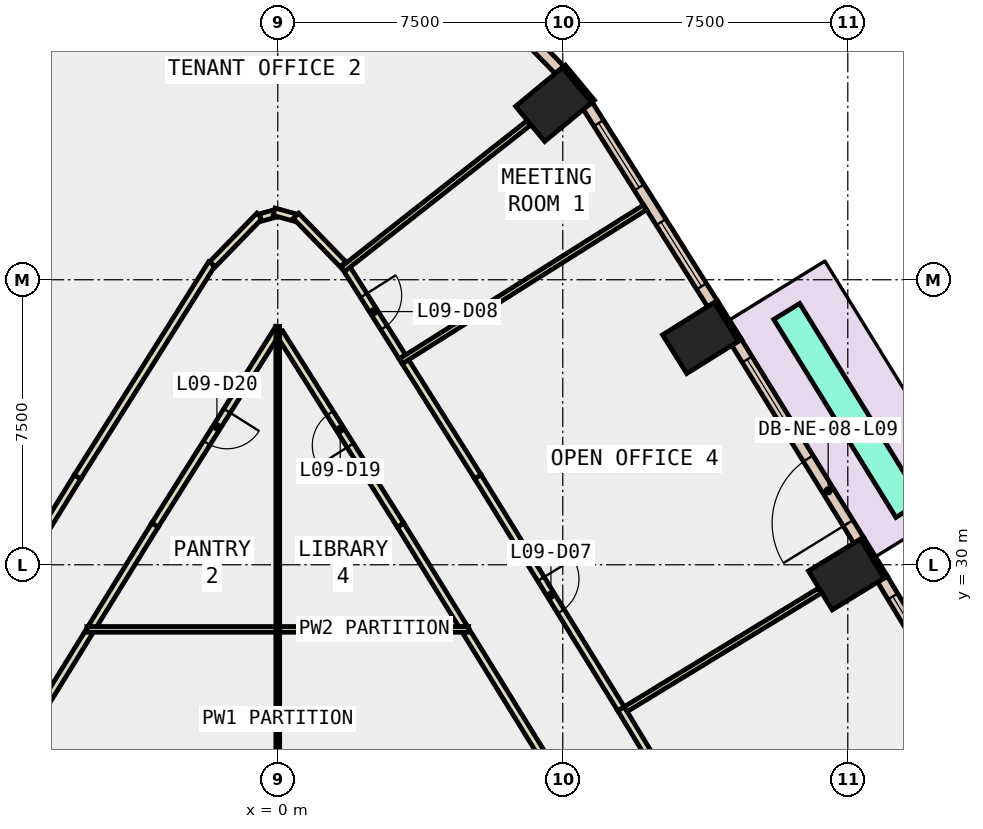
"""IFC4 building model, lengths in metres.
Left out: names, types, materials, properties, quantities, classifications, styles, units other than length and angle.
Written with IfcOpenShell. Run it as: python <this file> out.ifc"""

import sys

from ifc_helpers import new_model, si_unit, direction, frame, frame_2d, origin, origin_2d, place, context, subcontext, project, spatial, rectangle, extrude, element, fill, save


model = new_model("IFC4")
c1 = context("Model", 3, precision=1e-05, world=origin(), true_north=direction((0.0, 1.0)))
c2 = subcontext(c1, "Body", "Model", "MODEL_VIEW")
j1 = project(units=[si_unit("LENGTHUNIT", "METRE"), si_unit("PLANEANGLEUNIT", "RADIAN")], contexts=[c1])
p1 = place(None, origin())
s1 = spatial("IfcSite", under=j1, at=p1, CompositionType="ELEMENT")
p2 = place(p1, origin())
s2 = spatial("IfcBuilding", under=s1, at=p2, CompositionType="ELEMENT")
p3 = place(p2, frame((0.0, 0.0, 47.6)))
s3 = spatial("IfcBuildingStorey", under=s2, at=p3, CompositionType="ELEMENT", Elevation=47.6)
for number, where, z_axis, x_axis in (
    (1, (14.961, 29.743, -0.4), (0.0, 0.0, 1.0), (-0.522, 0.853, 0.0)),
    (2, (11.123, 35.965, -0.4), (0.0, 0.0, 1.0), (-0.53, 0.848, 0.0)),
    (3, (7.258, 42.111, -0.4), (0.0, 0.0, 1.0), (-0.638, 0.77, 0.0)),
):
    element("IfcColumn", number, at=place(p3, frame(where, z_axis=z_axis, x_axis=x_axis)), inside=s3, PredefinedType="COLUMN", context=c2, shape_type="SweptSolid", body=[
        extrude(rectangle(XDim=1.2, YDim=1.6, at=origin_2d()), origin(), (0.0, 0.0, 1.0), 4.2),
    ])
p4 = place(p3, frame((15.999, 29.674, 0.0), z_axis=(0.0, 0.0, 1.0), x_axis=(-0.521598117945, 0.853191305251, 0.0)))
e4 = element("IfcWall", 4, at=p4, inside=s3, PredefinedType="STANDARD", context=c2, shape_type="SweptSolid", body=[
    extrude(rectangle(XDim=1.2, YDim=0.1, at=frame_2d((0.6, 0.0))), origin(), (0.0, 0.0, 1.0), 3.8),
])
p5 = place(p3, frame((12.162, 35.907, 0.0), z_axis=(0.0, 0.0, 1.0), x_axis=(-0.530328162925, 0.847792450785, 0.0)))
e5 = element("IfcWall", 5, at=p5, inside=s3, PredefinedType="STANDARD", context=c2, shape_type="SweptSolid", body=[
    extrude(rectangle(XDim=1.2, YDim=0.1, at=frame_2d((0.6, 0.0))), origin(), (0.0, 0.0, 1.0), 3.8),
])
p6 = place(p3, frame((8.295, 42.191, 0.0), z_axis=(0.0, 0.0, 1.0), x_axis=(-0.637638520791, 0.770335716947, 0.0)))
e6 = element("IfcWall", 6, at=p6, inside=s3, PredefinedType="STANDARD", context=c2, shape_type="SweptSolid", body=[
    extrude(rectangle(XDim=1.199, YDim=0.1, at=frame_2d((0.6, 0.0))), origin(), (0.0, 0.0, 1.0), 3.8),
])
p7 = place(p3, frame((19.074, 24.38, 0.0), z_axis=(0.0, 0.0, 1.0), x_axis=(-0.516699243123, 0.856166976796, 0.0)))
e7 = element("IfcWall", 7, at=p7, inside=s3, PredefinedType="STANDARD", context=c2, shape_type="SweptSolid", body=[
    extrude(rectangle(XDim=6.122, YDim=0.3, at=frame_2d((3.061, 0.0))), origin(), (0.0, 0.0, 1.0), 3.8),
])
p8 = place(p7, frame((0.53, 0.0, 0.9)))
e8 = element("IfcOpeningElement", 8, at=p8, cuts=e7, PredefinedType="OPENING", context=c2, shape_type="SweptSolid", body=[
    extrude(rectangle(XDim=2.0, YDim=2.6, at=frame_2d((1.0, 1.3))), frame((0.0, 0.16, 0.0), z_axis=(0.0, -1.0, 0.0), x_axis=(1.0, 0.0, 0.0)), (0.0, 0.0, 1.0), 0.32),
])
p9 = place(p7, frame((3.591, 0.0, 0.9)))
e9 = element("IfcOpeningElement", 9, at=p9, cuts=e7, PredefinedType="OPENING", context=c2, shape_type="SweptSolid", body=[
    extrude(rectangle(XDim=2.0, YDim=2.6, at=frame_2d((1.0, 1.3))), frame((0.0, 0.16, 0.0), z_axis=(0.0, -1.0, 0.0), x_axis=(1.0, 0.0, 0.0)), (0.0, 0.0, 1.0), 0.32),
])
p10 = place(p3, frame((15.287, 30.644, 0.0), z_axis=(0.0, 0.0, 1.0), x_axis=(-0.525114088226, 0.851031840971, 0.0)))
e10 = element("IfcWall", 10, at=p10, inside=s3, PredefinedType="STANDARD", context=c2, shape_type="SweptSolid", body=[
    extrude(rectangle(XDim=6.121, YDim=0.3, at=frame_2d((3.061, 0.0))), origin(), (0.0, 0.0, 1.0), 3.8),
])
p11 = place(p10, frame((0.53, 0.0, 0.0)))
e11 = element("IfcOpeningElement", 11, at=p11, cuts=e10, PredefinedType="OPENING", context=c2, shape_type="SweptSolid", body=[
    extrude(rectangle(XDim=2.0, YDim=2.4, at=frame_2d((1.0, 1.2))), frame((0.0, 0.16, 0.0), z_axis=(0.0, -1.0, 0.0), x_axis=(1.0, 0.0, 0.0)), (0.0, 0.0, 1.0), 0.32),
])
p12 = place(p10, frame((3.591, 0.0, 0.9)))
e12 = element("IfcOpeningElement", 12, at=p12, cuts=e10, PredefinedType="OPENING", context=c2, shape_type="SweptSolid", body=[
    extrude(rectangle(XDim=2.0, YDim=2.6, at=frame_2d((1.0, 1.3))), frame((0.0, 0.16, 0.0), z_axis=(0.0, -1.0, 0.0), x_axis=(1.0, 0.0, 0.0)), (0.0, 0.0, 1.0), 0.32),
])
p13 = place(p3, frame((11.439, 36.869, 0.0), z_axis=(0.0, 0.0, 1.0), x_axis=(-0.533075127321, 0.846067910177, 0.0)))
e13 = element("IfcWall", 13, at=p13, inside=s3, PredefinedType="STANDARD", context=c2, shape_type="SweptSolid", body=[
    extrude(rectangle(XDim=6.157, YDim=0.3, at=frame_2d((3.078, 0.0))), origin(), (0.0, 0.0, 1.0), 3.8),
])
p14 = place(p13, frame((0.539, 0.0, 0.9)))
e14 = element("IfcOpeningElement", 14, at=p14, cuts=e13, PredefinedType="OPENING", context=c2, shape_type="SweptSolid", body=[
    extrude(rectangle(XDim=2.0, YDim=2.6, at=frame_2d((1.0, 1.3))), frame((0.0, 0.16, 0.0), z_axis=(0.0, -1.0, 0.0), x_axis=(1.0, 0.0, 0.0)), (0.0, 0.0, 1.0), 0.32),
])
p15 = place(p13, frame((3.618, 0.0, 0.9)))
e15 = element("IfcOpeningElement", 15, at=p15, cuts=e13, PredefinedType="OPENING", context=c2, shape_type="SweptSolid", body=[
    extrude(rectangle(XDim=2.0, YDim=2.6, at=frame_2d((1.0, 1.3))), frame((0.0, 0.16, 0.0), z_axis=(0.0, -1.0, 0.0), x_axis=(1.0, 0.0, 0.0)), (0.0, 0.0, 1.0), 0.32),
])
p16 = place(p3, frame((7.416, 43.02, 0.0), z_axis=(0.0, 0.0, 1.0), x_axis=(-0.696939827977, 0.717129609052, 0.0)))
e16 = element("IfcWall", 16, at=p16, inside=s3, PredefinedType="STANDARD", context=c2, shape_type="SweptSolid", body=[
    extrude(rectangle(XDim=3.422, YDim=0.3, at=frame_2d((1.711, 0.0))), origin(), (0.0, 0.0, 1.0), 3.8),
])
p17 = place(p16, frame((1.011, 0.0, 0.9)))
e17 = element("IfcOpeningElement", 17, at=p17, cuts=e16, PredefinedType="OPENING", context=c2, shape_type="SweptSolid", body=[
    extrude(rectangle(XDim=1.4, YDim=2.6, at=frame_2d((0.7, 1.3))), frame((0.0, 0.16, 0.0), z_axis=(0.0, -1.0, 0.0), x_axis=(1.0, 0.0, 0.0)), (0.0, 0.0, 1.0), 0.32),
])
p18 = place(p3, frame((-5.031, 45.474, 0.0), z_axis=(0.0, 0.0, 1.0), x_axis=(-0.696939827977, -0.717129609052, 0.0)))
e18 = element("IfcWall", 18, at=p18, inside=s3, PredefinedType="STANDARD", context=c2, shape_type="SweptSolid", body=[
    extrude(rectangle(XDim=3.422, YDim=0.3, at=frame_2d((1.711, 0.0))), origin(), (0.0, 0.0, 1.0), 3.8),
])
p19 = place(p18, frame((1.011, 0.0, 0.9)))
e19 = element("IfcOpeningElement", 19, at=p19, cuts=e18, PredefinedType="OPENING", context=c2, shape_type="SweptSolid", body=[
    extrude(rectangle(XDim=1.4, YDim=2.6, at=frame_2d((0.7, 1.3))), frame((0.0, 0.16, 0.0), z_axis=(0.0, -1.0, 0.0), x_axis=(1.0, 0.0, 0.0)), (0.0, 0.0, 1.0), 0.32),
])
p20 = place(p3, frame((16.606, 31.458, 0.0), z_axis=(0.0, 0.0, 1.0), x_axis=(-0.52504092683, 0.85107697957, 0.0)))
e20 = element("IfcWall", 20, at=p20, inside=s3, PredefinedType="STANDARD", context=c2, shape_type="SweptSolid", body=[
    extrude(rectangle(XDim=6.119, YDim=0.8, at=frame_2d((3.06, 0.0))), origin(), (0.0, 0.0, 1.0), 0.8),
])
for number, where, z_axis, x_axis in (
    (21, (7.022, 24.899, 0.0), (0.0, 0.0, 1.0), (-0.525, 0.851, 0.0)),
    (22, (-4.963, 28.236, 0.0), (0.0, 0.0, 1.0), (-0.525, -0.851, 0.0)),
):
    element("IfcWall", number, at=place(p3, frame(where, z_axis=z_axis, x_axis=x_axis)), inside=s3, PredefinedType="PARTITIONING", context=c2, shape_type="SweptSolid", body=[
        extrude(rectangle(XDim=3.921, YDim=0.2, at=frame_2d((1.961, 0.0))), origin(), (0.0, 0.0, 1.0), 3.8),
    ])
p21 = place(p3, frame((4.885, 28.364, 0.0), z_axis=(0.0, 0.0, 1.0), x_axis=(-0.525078663571, 0.851053698107, 0.0)))
e23 = element("IfcWall", 23, at=p21, inside=s3, PredefinedType="PARTITIONING", context=c2, shape_type="SweptSolid", body=[
    extrude(rectangle(XDim=3.15, YDim=0.2, at=frame_2d((1.575, 0.0))), origin(), (0.0, 0.0, 1.0), 3.8),
])
p22 = place(p3, frame((3.231, 31.045, 0.0), z_axis=(0.0, 0.0, 1.0), x_axis=(-0.533294550084, 0.845929620507, 0.0)))
e24 = element("IfcWall", 24, at=p22, inside=s3, PredefinedType="PARTITIONING", context=c2, shape_type="SweptSolid", body=[
    extrude(rectangle(XDim=5.959, YDim=0.2, at=frame_2d((2.979, 0.0))), origin(), (0.0, 0.0, 1.0), 3.8),
])
p23 = place(p22, frame((2.479, 0.0, 0.0)))
e25 = element("IfcOpeningElement", 25, at=p23, cuts=e24, PredefinedType="OPENING", context=c2, shape_type="SweptSolid", body=[
    extrude(rectangle(XDim=1.0, YDim=2.1, at=frame_2d((0.5, 1.05))), frame((0.0, 0.11, 0.0), z_axis=(0.0, -1.0, 0.0), x_axis=(1.0, 0.0, 0.0)), (0.0, 0.0, 1.0), 0.22),
])
p24 = place(p3, frame((0.027, 36.213, 0.0), z_axis=(0.0, 0.0, 1.0), x_axis=(-0.533299680037, -0.845926386438, 0.0)))
e26 = element("IfcWall", 26, at=p24, inside=s3, PredefinedType="PARTITIONING", context=c2, shape_type="SweptSolid", body=[
    extrude(rectangle(XDim=6.109, YDim=0.2, at=frame_2d((3.055, 0.0))), origin(), (0.0, 0.0, 1.0), 3.8),
])
p25 = place(p24, frame((2.554, 0.0, 0.0)))
e27 = element("IfcOpeningElement", 27, at=p25, cuts=e26, PredefinedType="OPENING", context=c2, shape_type="SweptSolid", body=[
    extrude(rectangle(XDim=1.0, YDim=2.1, at=frame_2d((0.5, 1.05))), frame((0.0, 0.11, 0.0), z_axis=(0.0, -1.0, 0.0), x_axis=(1.0, 0.0, 0.0)), (0.0, 0.0, 1.0), 0.22),
])
p26 = place(p3, frame((-3.231, 31.045, 0.0), z_axis=(0.0, 0.0, 1.0), x_axis=(-0.525078663571, -0.851053698107, 0.0)))
e28 = element("IfcWall", 28, at=p26, inside=s3, PredefinedType="PARTITIONING", context=c2, shape_type="SweptSolid", body=[
    extrude(rectangle(XDim=3.15, YDim=0.2, at=frame_2d((1.575, 0.0))), origin(), (0.0, 0.0, 1.0), 3.8),
])
p27 = place(p3, frame((9.032, 26.213, 0.0), z_axis=(0.0, 0.0, 1.0), x_axis=(0.516789314756, -0.856112611841, 0.0)))
e29 = element("IfcWall", 29, at=p27, inside=s3, PredefinedType="PARTITIONING", context=c2, shape_type="SweptSolid", body=[
    extrude(rectangle(XDim=7.32, YDim=0.2, at=frame_2d((3.66, 0.0))), origin(), (0.0, 0.0, 1.0), 3.8),
])
p28 = place(p27, frame((3.16, 0.0, 0.0)))
e30 = element("IfcOpeningElement", 30, at=p28, cuts=e29, PredefinedType="OPENING", context=c2, shape_type="SweptSolid", body=[
    extrude(rectangle(XDim=1.0, YDim=2.1, at=frame_2d((0.5, 1.05))), frame((0.0, 0.11, 0.0), z_axis=(0.0, -1.0, 0.0), x_axis=(1.0, 0.0, 0.0)), (0.0, 0.0, 1.0), 0.22),
])
p29 = place(p3, frame((3.359, 35.341, 0.0), z_axis=(0.0, 0.0, 1.0), x_axis=(0.533386910893, -0.845871386966, 0.0)))
e31 = element("IfcWall", 31, at=p29, inside=s3, PredefinedType="PARTITIONING", context=c2, shape_type="SweptSolid", body=[
    extrude(rectangle(XDim=3.578, YDim=0.2, at=frame_2d((1.789, 0.0))), origin(), (0.0, 0.0, 1.0), 3.8),
])
p30 = place(p3, frame((5.267, 32.315, 0.0), z_axis=(0.0, 0.0, 1.0), x_axis=(0.524988204957, -0.851109502153, 0.0)))
e32 = element("IfcWall", 32, at=p30, inside=s3, PredefinedType="PARTITIONING", context=c2, shape_type="SweptSolid", body=[
    extrude(rectangle(XDim=7.169, YDim=0.2, at=frame_2d((3.585, 0.0))), origin(), (0.0, 0.0, 1.0), 3.8),
])
p31 = place(p30, frame((3.16, 0.0, 0.0)))
e33 = element("IfcOpeningElement", 33, at=p31, cuts=e32, PredefinedType="OPENING", context=c2, shape_type="SweptSolid", body=[
    extrude(rectangle(XDim=1.0, YDim=2.1, at=frame_2d((0.5, 1.05))), frame((0.0, 0.11, 0.0), z_axis=(0.0, -1.0, 0.0), x_axis=(1.0, 0.0, 0.0)), (0.0, 0.0, 1.0), 0.22),
])
p32 = place(p3, frame((1.775, 37.856, 0.0), z_axis=(0.0, 0.0, 1.0), x_axis=(0.533221537001, -0.845975645322, 0.0)))
e34 = element("IfcWall", 34, at=p32, inside=s3, PredefinedType="PARTITIONING", context=c2, shape_type="SweptSolid", body=[
    extrude(rectangle(XDim=2.823, YDim=0.2, at=frame_2d((1.411, 0.0))), origin(), (0.0, 0.0, 1.0), 3.8),
])
p33 = place(p32, frame((0.911, 0.0, 0.0)))
e35 = element("IfcOpeningElement", 35, at=p33, cuts=e34, PredefinedType="OPENING", context=c2, shape_type="SweptSolid", body=[
    extrude(rectangle(XDim=1.0, YDim=2.1, at=frame_2d((0.5, 1.05))), frame((0.0, 0.11, 0.0), z_axis=(0.0, -1.0, 0.0), x_axis=(1.0, 0.0, 0.0)), (0.0, 0.0, 1.0), 0.22),
])
p34 = place(p3, frame((-9.11, 26.085, 0.0), z_axis=(0.0, 0.0, 1.0), x_axis=(0.525007100846, 0.85109784635, 0.0)))
e36 = element("IfcWall", 36, at=p34, inside=s3, PredefinedType="PARTITIONING", context=c2, shape_type="SweptSolid", body=[
    extrude(rectangle(XDim=7.32, YDim=0.2, at=frame_2d((3.66, 0.0))), origin(), (0.0, 0.0, 1.0), 3.8),
])
p35 = place(p34, frame((3.16, 0.0, 0.0)))
e37 = element("IfcOpeningElement", 37, at=p35, cuts=e36, PredefinedType="OPENING", context=c2, shape_type="SweptSolid", body=[
    extrude(rectangle(XDim=1.0, YDim=2.1, at=frame_2d((0.5, 1.05))), frame((0.0, 0.11, 0.0), z_axis=(0.0, -1.0, 0.0), x_axis=(1.0, 0.0, 0.0)), (0.0, 0.0, 1.0), 0.22),
])
p36 = place(p3, frame((-5.267, 32.315, 0.0), z_axis=(0.0, 0.0, 1.0), x_axis=(0.533195424135, 0.845992103794, 0.0)))
e38 = element("IfcWall", 38, at=p36, inside=s3, PredefinedType="PARTITIONING", context=c2, shape_type="SweptSolid", body=[
    extrude(rectangle(XDim=6.624, YDim=0.2, at=frame_2d((3.312, 0.0))), origin(), (0.0, 0.0, 1.0), 3.8),
])
p37 = place(p3, frame((-1.718, 37.906, 0.0), z_axis=(0.0, 0.0, 1.0), x_axis=(0.696949052806, 0.71712064382, 0.0)))
e39 = element("IfcWall", 39, at=p37, inside=s3, PredefinedType="PARTITIONING", context=c2, shape_type="SweptSolid", body=[
    extrude(rectangle(XDim=1.779, YDim=0.2, at=frame_2d((0.89, 0.0))), origin(), (0.0, 0.0, 1.0), 3.8),
])
p38 = place(p3, frame((-0.452, 39.137, 0.0), z_axis=(0.0, 0.0, 1.0), x_axis=(0.963347325023, 0.26825721122, 0.0)))
e40 = element("IfcWall", 40, at=p38, inside=s3, PredefinedType="PARTITIONING", context=c2, shape_type="SweptSolid", body=[
    extrude(rectangle(XDim=0.369, YDim=0.2, at=frame_2d((0.185, 0.0))), origin(), (0.0, 0.0, 1.0), 3.8),
])
p39 = place(p3, frame((-0.096, 39.29, 0.0), z_axis=(0.0, 0.0, 1.0), x_axis=(0.963110974003, -0.269104536854, 0.0)))
e41 = element("IfcWall", 41, at=p39, inside=s3, PredefinedType="PARTITIONING", context=c2, shape_type="SweptSolid", body=[
    extrude(rectangle(XDim=0.569, YDim=0.2, at=frame_2d((0.284, 0.0))), origin(), (0.0, 0.0, 1.0), 3.8),
])
p40 = place(p3, frame((0.478, 39.182, 0.0), z_axis=(0.0, 0.0, 1.0), x_axis=(0.696949052806, -0.71712064382, 0.0)))
e42 = element("IfcWall", 42, at=p40, inside=s3, PredefinedType="PARTITIONING", context=c2, shape_type="SweptSolid", body=[
    extrude(rectangle(XDim=1.779, YDim=0.2, at=frame_2d((0.89, 0.0))), origin(), (0.0, 0.0, 1.0), 3.8),
])
p41 = place(p3, frame((0.0, 23.5, 0.0), z_axis=(0.0, 0.0, 1.0), x_axis=(0.0, 1.0, 0.0)))
e43 = element("IfcWall", 43, at=p41, inside=s3, PredefinedType="PARTITIONING", context=c2, shape_type="SweptSolid", body=[
    extrude(rectangle(XDim=4.875, YDim=0.1, at=frame_2d((2.438, 0.0))), origin(), (0.0, 0.0, 1.0), 3.8),
])
for number, where, z_axis, x_axis in (
    (44, (0.05, 28.3, 0.0), (0.0, 0.0, 1.0), (1.0, 0.0, 0.0)),
    (45, (-5.024, 28.3, 0.0), (0.0, 0.0, 1.0), (1.0, 0.0, 0.0)),
):
    element("IfcWall", number, at=place(p3, frame(where, z_axis=z_axis, x_axis=x_axis)), inside=s3, PredefinedType="PARTITIONING", context=c2, shape_type="SweptSolid", body=[
        extrude(rectangle(XDim=4.974, YDim=0.15, at=frame_2d((2.487, 0.0))), origin(), (0.0, 0.0, 1.0), 3.8),
    ])
p42 = place(p3, frame((0.0, 28.375, 0.0), z_axis=(0.0, 0.0, 1.0), x_axis=(0.0, 1.0, 0.0)))
e46 = element("IfcWall", 46, at=p42, inside=s3, PredefinedType="PARTITIONING", context=c2, shape_type="SweptSolid", body=[
    extrude(rectangle(XDim=7.895, YDim=0.1, at=frame_2d((3.948, 0.0))), origin(), (0.0, 0.0, 1.0), 3.8),
])
p43 = place(p3, frame((9.156, 26.201, 0.0), z_axis=(0.0, 0.0, 1.0), x_axis=(0.853632819511, 0.520875234057, 0.0)))
e47 = element("IfcWall", 47, at=p43, inside=s3, PredefinedType="PARTITIONING", context=c2, shape_type="SweptSolid", body=[
    extrude(rectangle(XDim=5.98, YDim=0.15, at=frame_2d((2.99, 0.0))), origin(), (0.0, 0.0, 1.0), 3.8),
])
p44 = place(p3, frame((3.235, 35.352, 0.0), z_axis=(0.0, 0.0, 1.0), x_axis=(0.845987036055, 0.533203464755, 0.0)))
e48 = element("IfcWall", 48, at=p44, inside=s3, PredefinedType="PARTITIONING", context=c2, shape_type="SweptSolid", body=[
    extrude(rectangle(XDim=7.599, YDim=0.15, at=frame_2d((3.8, 0.0))), origin(), (0.0, 0.0, 1.0), 3.8),
])
p45 = place(p3, frame((1.709, 37.773, 0.0), z_axis=(0.0, 0.0, 1.0), x_axis=(0.785857956092, 0.618407044629, 0.0)))
e49 = element("IfcWall", 49, at=p45, inside=s3, PredefinedType="PARTITIONING", context=c2, shape_type="SweptSolid", body=[
    extrude(rectangle(XDim=6.223, YDim=0.15, at=frame_2d((3.111, 0.0))), origin(), (0.0, 0.0, 1.0), 3.8),
])
p46 = place(p9, origin())
e50 = element("IfcWindow", 50, at=p46, inside=s3, PartitioningType="SINGLE_PANEL", PredefinedType="WINDOW", context=c2, shape_type="SweptSolid", body=[
    extrude(rectangle(XDim=2.0, YDim=2.6, at=frame_2d((1.0, 1.3))), frame((0.0, 0.03, 0.0), z_axis=(0.0, -1.0, 0.0), x_axis=(1.0, 0.0, 0.0)), (0.0, 0.0, 1.0), 0.06),
])
fill(e9, e50)
p47 = place(p11, origin())
e51 = element("IfcDoor", 51, at=p47, inside=s3, OperationType="SLIDING_TO_LEFT", PredefinedType="DOOR", context=c2, shape_type="SweptSolid", body=[
    extrude(rectangle(XDim=2.0, YDim=2.4, at=frame_2d((1.0, 1.2))), frame((0.0, 0.025, 0.0), z_axis=(0.0, -1.0, 0.0), x_axis=(1.0, 0.0, 0.0)), (0.0, 0.0, 1.0), 0.05),
])
fill(e11, e51)
p48 = place(p12, origin())
e52 = element("IfcWindow", 52, at=p48, inside=s3, PartitioningType="SINGLE_PANEL", PredefinedType="WINDOW", context=c2, shape_type="SweptSolid", body=[
    extrude(rectangle(XDim=2.0, YDim=2.6, at=frame_2d((1.0, 1.3))), frame((0.0, 0.03, 0.0), z_axis=(0.0, -1.0, 0.0), x_axis=(1.0, 0.0, 0.0)), (0.0, 0.0, 1.0), 0.06),
])
fill(e12, e52)
p49 = place(p14, origin())
e53 = element("IfcWindow", 53, at=p49, inside=s3, PartitioningType="SINGLE_PANEL", PredefinedType="WINDOW", context=c2, shape_type="SweptSolid", body=[
    extrude(rectangle(XDim=2.0, YDim=2.6, at=frame_2d((1.0, 1.3))), frame((0.0, 0.03, 0.0), z_axis=(0.0, -1.0, 0.0), x_axis=(1.0, 0.0, 0.0)), (0.0, 0.0, 1.0), 0.06),
])
fill(e14, e53)
p50 = place(p15, origin())
e54 = element("IfcWindow", 54, at=p50, inside=s3, PartitioningType="SINGLE_PANEL", PredefinedType="WINDOW", context=c2, shape_type="SweptSolid", body=[
    extrude(rectangle(XDim=2.0, YDim=2.6, at=frame_2d((1.0, 1.3))), frame((0.0, 0.03, 0.0), z_axis=(0.0, -1.0, 0.0), x_axis=(1.0, 0.0, 0.0)), (0.0, 0.0, 1.0), 0.06),
])
fill(e15, e54)
p51 = place(p31, origin())
e55 = element("IfcDoor", 55, at=p51, inside=s3, OperationType="SINGLE_SWING_RIGHT", PredefinedType="DOOR", context=c2, shape_type="SweptSolid", body=[
    extrude(rectangle(XDim=1.0, YDim=2.1, at=frame_2d((0.5, 1.05))), frame((0.0, 0.025, 0.0), z_axis=(0.0, -1.0, 0.0), x_axis=(1.0, 0.0, 0.0)), (0.0, 0.0, 1.0), 0.05),
])
fill(e33, e55)
p52 = place(p33, origin())
e56 = element("IfcDoor", 56, at=p52, inside=s3, OperationType="SINGLE_SWING_LEFT", PredefinedType="DOOR", context=c2, shape_type="SweptSolid", body=[
    extrude(rectangle(XDim=1.0, YDim=2.1, at=frame_2d((0.5, 1.05))), frame((0.0, 0.025, 0.0), z_axis=(0.0, -1.0, 0.0), x_axis=(1.0, 0.0, 0.0)), (0.0, 0.0, 1.0), 0.05),
])
fill(e35, e56)
p53 = place(p23, origin())
e57 = element("IfcDoor", 57, at=p53, inside=s3, OperationType="SINGLE_SWING_LEFT", PredefinedType="DOOR", context=c2, shape_type="SweptSolid", body=[
    extrude(rectangle(XDim=1.0, YDim=2.1, at=frame_2d((0.5, 1.05))), frame((0.0, 0.025, 0.0), z_axis=(0.0, -1.0, 0.0), x_axis=(1.0, 0.0, 0.0)), (0.0, 0.0, 1.0), 0.05),
])
fill(e25, e57)
p54 = place(p25, origin())
e58 = element("IfcDoor", 58, at=p54, inside=s3, OperationType="SINGLE_SWING_LEFT", PredefinedType="DOOR", context=c2, shape_type="SweptSolid", body=[
    extrude(rectangle(XDim=1.0, YDim=2.1, at=frame_2d((0.5, 1.05))), frame((0.0, 0.025, 0.0), z_axis=(0.0, -1.0, 0.0), x_axis=(1.0, 0.0, 0.0)), (0.0, 0.0, 1.0), 0.05),
])
fill(e27, e58)
save(model, sys.argv[1])
